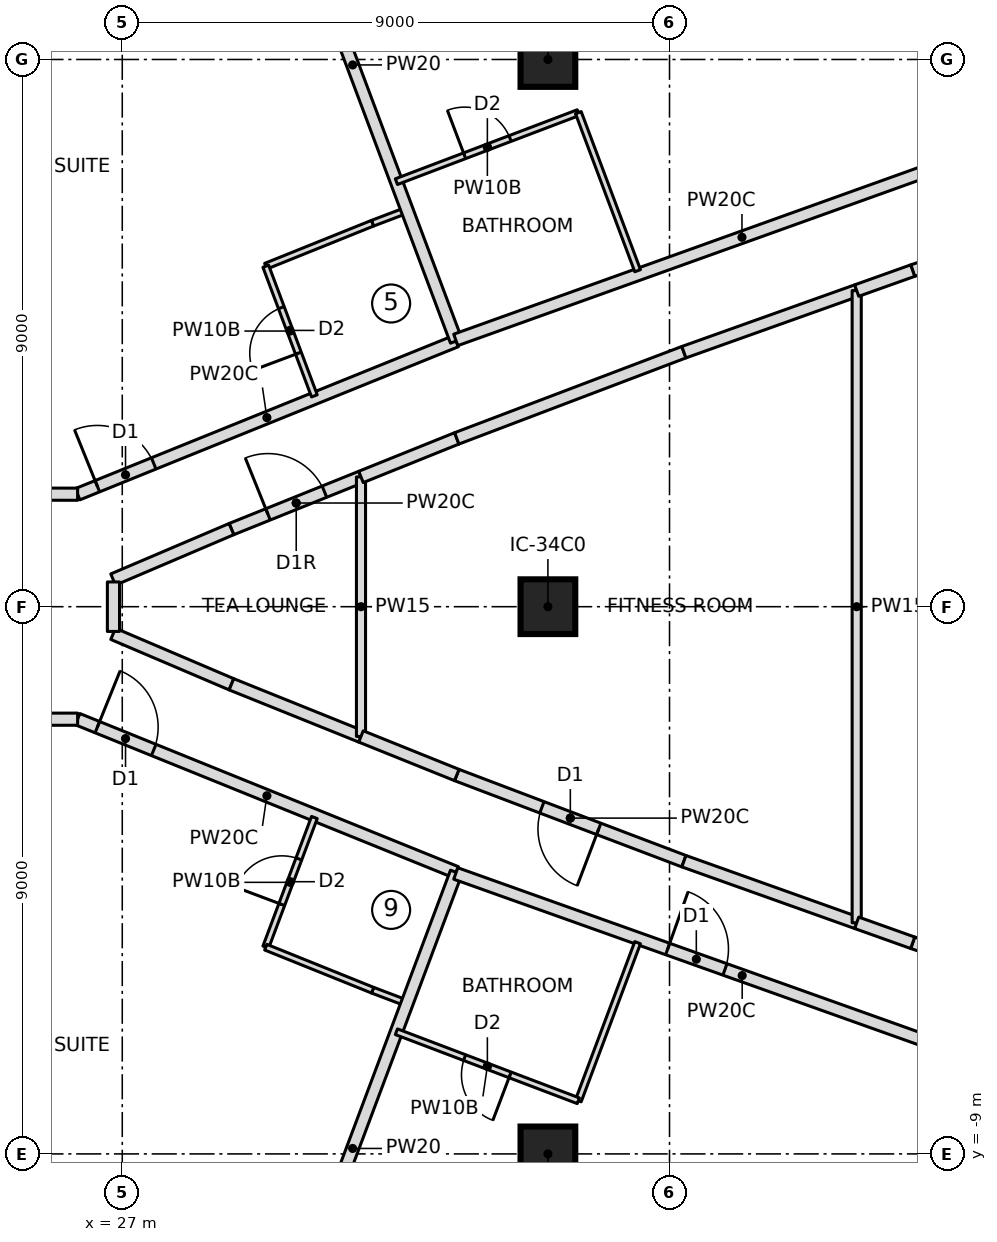
"""IFC4 building model, lengths in metres.
Left out: names, types, materials, properties, quantities, classifications, styles, units other than length and angle.
Written with IfcOpenShell. Run it as: python <this file> out.ifc"""

import sys

from ifc_helpers import new_model, si_unit, direction, frame, frame_2d, origin, origin_2d, place, context, subcontext, project, spatial, rectangle, extrude, element, fill, save


model = new_model("IFC4")
c1 = context("Model", 3, precision=1e-05, world=origin(), true_north=direction((0.0, 1.0)))
c2 = subcontext(c1, "Body", "Model", "MODEL_VIEW")
j1 = project(units=[si_unit("LENGTHUNIT", "METRE"), si_unit("PLANEANGLEUNIT", "RADIAN")], contexts=[c1])
p1 = place(None, origin())
s1 = spatial("IfcSite", under=j1, at=p1, CompositionType="ELEMENT")
p2 = place(p1, origin())
s2 = spatial("IfcBuilding", under=s1, at=p2, CompositionType="ELEMENT")
p3 = place(p2, frame((0.0, 0.0, 235.0)))
s3 = spatial("IfcBuildingStorey", under=s2, at=p3, CompositionType="ELEMENT", Elevation=235.0)
for number, where, z_axis, x_axis in (
    (1, (34.0, -9.0, 0.0), (0.0, 0.0, 1.0), (1.0, 0.0, 0.0)),
    (2, (34.0, 0.0, 0.0), (0.0, 0.0, 1.0), (1.0, 0.0, 0.0)),
    (3, (34.0, 9.0, 0.0), (0.0, 0.0, 1.0), (1.0, 0.0, 0.0)),
):
    element("IfcColumn", number, at=place(p3, frame(where, z_axis=z_axis, x_axis=x_axis)), inside=s3, PredefinedType="COLUMN", context=c2, shape_type="SweptSolid", body=[
        extrude(rectangle(XDim=0.9, YDim=0.9, at=origin_2d()), origin(), (0.0, 0.0, 1.0), 3.55),
    ])
p4 = place(p3, frame((26.266, 1.85, 0.0), z_axis=(0.0, 0.0, 1.0), x_axis=(0.927007906702, 0.375041785555, 0.0)))
e4 = element("IfcWall", 4, at=p4, inside=s3, PredefinedType="PARTITIONING", context=c2, shape_type="SweptSolid", body=[
    extrude(rectangle(XDim=6.716, YDim=0.2, at=frame_2d((3.358, 0.0))), origin(), (0.0, 0.0, 1.0), 3.25),
])
p5 = place(p4, frame((0.35, 0.0, 0.0)))
e5 = element("IfcOpeningElement", 5, at=p5, cuts=e4, PredefinedType="OPENING", context=c2, shape_type="SweptSolid", body=[
    extrude(rectangle(XDim=1.0, YDim=2.1, at=frame_2d((0.5, 1.05))), frame((0.0, 0.11, 0.0), z_axis=(0.0, -1.0, 0.0), x_axis=(1.0, 0.0, 0.0)), (0.0, 0.0, 1.0), 0.22),
])
p6 = place(p3, frame((29.36, 5.6, 0.0), z_axis=(0.0, 0.0, 1.0), x_axis=(0.927594225674, 0.373589283166, 0.0)))
e6 = element("IfcWall", 6, at=p6, inside=s3, PredefinedType="PARTITIONING", context=c2, shape_type="SweptSolid", body=[
    extrude(rectangle(XDim=1.895, YDim=0.1, at=frame_2d((0.947, 0.0))), origin(), (0.0, 0.0, 1.0), 3.25),
])
p7 = place(p3, frame((31.117, 6.308, 0.0), z_axis=(0.0, 0.0, 1.0), x_axis=(0.935048188903, 0.354520640342, 0.0)))
e7 = element("IfcWall", 7, at=p7, inside=s3, PredefinedType="PARTITIONING", context=c2, shape_type="SweptSolid", body=[
    extrude(rectangle(XDim=0.606, YDim=0.1, at=frame_2d((0.303, 0.0))), origin(), (0.0, 0.0, 1.0), 3.25),
])
p8 = place(p3, frame((30.16, 3.467, 0.0), z_axis=(0.0, 0.0, 1.0), x_axis=(-0.351158682313, 0.936315961541, 0.0)))
e8 = element("IfcWall", 8, at=p8, inside=s3, PredefinedType="PARTITIONING", context=c2, shape_type="SweptSolid", body=[
    extrude(rectangle(XDim=2.278, YDim=0.1, at=frame_2d((1.139, 0.0))), origin(), (0.0, 0.0, 1.0), 3.25),
])
p9 = place(p8, frame((0.75, 0.0, 0.0)))
e9 = element("IfcOpeningElement", 9, at=p9, cuts=e8, PredefinedType="OPENING", context=c2, shape_type="SweptSolid", body=[
    extrude(rectangle(XDim=0.8, YDim=2.1, at=frame_2d((0.4, 1.05))), frame((0.0, 0.06, 0.0), z_axis=(0.0, -1.0, 0.0), x_axis=(1.0, 0.0, 0.0)), (0.0, 0.0, 1.0), 0.12),
])
p10 = place(p3, frame((32.492, 4.369, 0.0), z_axis=(0.0, 0.0, 1.0), x_axis=(-0.351128958016, 0.93632710889, 0.0)))
e10 = element("IfcWall", 10, at=p10, inside=s3, PredefinedType="PARTITIONING", context=c2, shape_type="SweptSolid", body=[
    extrude(rectangle(XDim=9.7, YDim=0.2, at=frame_2d((4.85, 0.0))), origin(), (0.0, 0.0, 1.0), 3.25),
])
p11 = place(p3, frame((41.898, 7.764, 0.0), z_axis=(0.0, 0.0, 1.0), x_axis=(-0.941277643829, -0.337633525034, 0.0)))
e11 = element("IfcWall", 11, at=p11, inside=s3, PredefinedType="PARTITIONING", context=c2, shape_type="SweptSolid", body=[
    extrude(rectangle(XDim=10.001, YDim=0.2, at=frame_2d((5.0, 0.0))), origin(), (0.0, 0.0, 1.0), 3.25),
])
p12 = place(p11, frame((0.35, 0.0, 0.0)))
e12 = element("IfcOpeningElement", 12, at=p12, cuts=e11, PredefinedType="OPENING", context=c2, shape_type="SweptSolid", body=[
    extrude(rectangle(XDim=1.0, YDim=2.1, at=frame_2d((0.5, 1.05))), frame((0.0, 0.11, 0.0), z_axis=(0.0, -1.0, 0.0), x_axis=(1.0, 0.0, 0.0)), (0.0, 0.0, 1.0), 0.22),
])
p13 = place(p3, frame((31.509, 6.991, 0.0), z_axis=(0.0, 0.0, 1.0), x_axis=(0.934948661714, 0.354783032232, 0.0)))
e13 = element("IfcWall", 13, at=p13, inside=s3, PredefinedType="PARTITIONING", context=c2, shape_type="SweptSolid", body=[
    extrude(rectangle(XDim=3.2, YDim=0.1, at=frame_2d((1.6, 0.0))), origin(), (0.0, 0.0, 1.0), 3.25),
])
p14 = place(p13, frame((1.2, 0.0, 0.0)))
e14 = element("IfcOpeningElement", 14, at=p14, cuts=e13, PredefinedType="OPENING", context=c2, shape_type="SweptSolid", body=[
    extrude(rectangle(XDim=0.8, YDim=2.1, at=frame_2d((0.4, 1.05))), frame((0.0, 0.06, 0.0), z_axis=(0.0, -1.0, 0.0), x_axis=(1.0, 0.0, 0.0)), (0.0, 0.0, 1.0), 0.12),
])
p15 = place(p3, frame((34.5, 8.126, 0.0), z_axis=(0.0, 0.0, 1.0), x_axis=(0.351065630332, -0.936350854755, 0.0)))
e15 = element("IfcWall", 15, at=p15, inside=s3, PredefinedType="PARTITIONING", context=c2, shape_type="SweptSolid", body=[
    extrude(rectangle(XDim=2.777, YDim=0.1, at=frame_2d((1.388, 0.0))), origin(), (0.0, 0.0, 1.0), 3.25),
])
p16 = place(p3, frame((41.906, 7.746, 0.0), z_axis=(0.0, 0.0, 1.0), x_axis=(-0.35112895446, 0.936327110224, 0.0)))
e16 = element("IfcWall", 16, at=p16, inside=s3, PredefinedType="PARTITIONING", context=c2, shape_type="SweptSolid", body=[
    extrude(rectangle(XDim=9.706, YDim=0.2, at=frame_2d((4.853, 0.0))), origin(), (0.0, 0.0, 1.0), 3.25),
])
p17 = place(p3, frame((26.266, -1.85, 0.0), z_axis=(0.0, 0.0, 1.0), x_axis=(0.927007906702, -0.375041785555, 0.0)))
e17 = element("IfcWall", 17, at=p17, inside=s3, PredefinedType="PARTITIONING", context=c2, shape_type="SweptSolid", body=[
    extrude(rectangle(XDim=6.716, YDim=0.2, at=frame_2d((3.358, 0.0))), origin(), (0.0, 0.0, 1.0), 3.25),
])
p18 = place(p17, frame((0.35, 0.0, 0.0)))
e18 = element("IfcOpeningElement", 18, at=p18, cuts=e17, PredefinedType="OPENING", context=c2, shape_type="SweptSolid", body=[
    extrude(rectangle(XDim=1.0, YDim=2.1, at=frame_2d((0.5, 1.05))), frame((0.0, 0.11, 0.0), z_axis=(0.0, -1.0, 0.0), x_axis=(1.0, 0.0, 0.0)), (0.0, 0.0, 1.0), 0.22),
])
p19 = place(p3, frame((29.36, -5.6, 0.0), z_axis=(0.0, 0.0, 1.0), x_axis=(0.351158682313, 0.936315961541, 0.0)))
e19 = element("IfcWall", 19, at=p19, inside=s3, PredefinedType="PARTITIONING", context=c2, shape_type="SweptSolid", body=[
    extrude(rectangle(XDim=2.278, YDim=0.1, at=frame_2d((1.139, 0.0))), origin(), (0.0, 0.0, 1.0), 3.25),
])
p20 = place(p19, frame((0.75, 0.0, 0.0)))
e20 = element("IfcOpeningElement", 20, at=p20, cuts=e19, PredefinedType="OPENING", context=c2, shape_type="SweptSolid", body=[
    extrude(rectangle(XDim=0.8, YDim=2.1, at=frame_2d((0.4, 1.05))), frame((0.0, 0.06, 0.0), z_axis=(0.0, -1.0, 0.0), x_axis=(1.0, 0.0, 0.0)), (0.0, 0.0, 1.0), 0.12),
])
p21 = place(p3, frame((31.684, -6.522, 0.0), z_axis=(0.0, 0.0, 1.0), x_axis=(-0.935048188903, 0.354520640342, 0.0)))
e21 = element("IfcWall", 21, at=p21, inside=s3, PredefinedType="PARTITIONING", context=c2, shape_type="SweptSolid", body=[
    extrude(rectangle(XDim=0.606, YDim=0.1, at=frame_2d((0.303, 0.0))), origin(), (0.0, 0.0, 1.0), 3.25),
])
p22 = place(p3, frame((31.117, -6.308, 0.0), z_axis=(0.0, 0.0, 1.0), x_axis=(-0.927594225674, 0.373589283166, 0.0)))
e22 = element("IfcWall", 22, at=p22, inside=s3, PredefinedType="PARTITIONING", context=c2, shape_type="SweptSolid", body=[
    extrude(rectangle(XDim=1.895, YDim=0.1, at=frame_2d((0.947, 0.0))), origin(), (0.0, 0.0, 1.0), 3.25),
])
p23 = place(p3, frame((29.086, -13.451, 0.0), z_axis=(0.0, 0.0, 1.0), x_axis=(0.351128958016, 0.93632710889, 0.0)))
e23 = element("IfcWall", 23, at=p23, inside=s3, PredefinedType="PARTITIONING", context=c2, shape_type="SweptSolid", body=[
    extrude(rectangle(XDim=9.7, YDim=0.2, at=frame_2d((4.85, 0.0))), origin(), (0.0, 0.0, 1.0), 3.25),
])
p24 = place(p3, frame((32.485, -4.388, 0.0), z_axis=(0.0, 0.0, 1.0), x_axis=(0.941953797829, -0.335742524498, 0.0)))
e24 = element("IfcWall", 24, at=p24, inside=s3, PredefinedType="PARTITIONING", context=c2, shape_type="SweptSolid", body=[
    extrude(rectangle(XDim=10.001, YDim=0.2, at=frame_2d((5.001, 0.0))), origin(), (0.0, 0.0, 1.0), 3.25),
])
p25 = place(p24, frame((3.7, 0.0, 0.0)))
e25 = element("IfcOpeningElement", 25, at=p25, cuts=e24, PredefinedType="OPENING", context=c2, shape_type="SweptSolid", body=[
    extrude(rectangle(XDim=1.0, YDim=2.1, at=frame_2d((0.5, 1.05))), frame((0.0, 0.11, 0.0), z_axis=(0.0, -1.0, 0.0), x_axis=(1.0, 0.0, 0.0)), (0.0, 0.0, 1.0), 0.22),
])
p26 = place(p3, frame((35.475, -5.526, 0.0), z_axis=(0.0, 0.0, 1.0), x_axis=(-0.351065630332, -0.936350854755, 0.0)))
e26 = element("IfcWall", 26, at=p26, inside=s3, PredefinedType="PARTITIONING", context=c2, shape_type="SweptSolid", body=[
    extrude(rectangle(XDim=2.777, YDim=0.1, at=frame_2d((1.388, 0.0))), origin(), (0.0, 0.0, 1.0), 3.25),
])
p27 = place(p3, frame((34.5, -8.126, 0.0), z_axis=(0.0, 0.0, 1.0), x_axis=(-0.934948661714, 0.354783032232, 0.0)))
e27 = element("IfcWall", 27, at=p27, inside=s3, PredefinedType="PARTITIONING", context=c2, shape_type="SweptSolid", body=[
    extrude(rectangle(XDim=3.2, YDim=0.1, at=frame_2d((1.6, 0.0))), origin(), (0.0, 0.0, 1.0), 3.25),
])
p28 = place(p27, frame((1.2, 0.0, 0.0)))
e28 = element("IfcOpeningElement", 28, at=p28, cuts=e27, PredefinedType="OPENING", context=c2, shape_type="SweptSolid", body=[
    extrude(rectangle(XDim=0.8, YDim=2.1, at=frame_2d((0.4, 1.05))), frame((0.0, 0.06, 0.0), z_axis=(0.0, -1.0, 0.0), x_axis=(1.0, 0.0, 0.0)), (0.0, 0.0, 1.0), 0.12),
])
p29 = place(p3, frame((38.497, -16.834, 0.0), z_axis=(0.0, 0.0, 1.0), x_axis=(0.35112895446, 0.936327110224, 0.0)))
e29 = element("IfcWall", 29, at=p29, inside=s3, PredefinedType="PARTITIONING", context=c2, shape_type="SweptSolid", body=[
    extrude(rectangle(XDim=9.706, YDim=0.2, at=frame_2d((4.853, 0.0))), origin(), (0.0, 0.0, 1.0), 3.25),
])
p30 = place(p3, frame((28.796, 1.276, 0.0), z_axis=(0.0, 0.0, 1.0), x_axis=(0.927609077038, 0.373552406224, 0.0)))
e30 = element("IfcWall", 30, at=p30, inside=s3, PredefinedType="PARTITIONING", context=c2, shape_type="SweptSolid", body=[
    extrude(rectangle(XDim=2.297, YDim=0.2, at=frame_2d((1.148, 0.0))), origin(), (0.0, 0.0, 1.0), 3.25),
])
p31 = place(p30, frame((0.648, 0.0, 0.0)))
e31 = element("IfcOpeningElement", 31, at=p31, cuts=e30, PredefinedType="OPENING", context=c2, shape_type="SweptSolid", body=[
    extrude(rectangle(XDim=1.0, YDim=2.1, at=frame_2d((0.5, 1.05))), frame((0.0, 0.11, 0.0), z_axis=(0.0, -1.0, 0.0), x_axis=(1.0, 0.0, 0.0)), (0.0, 0.0, 1.0), 0.22),
])
for number, where, z_axis, x_axis in (
    (32, (28.796, -1.276, 0.0), (0.0, 0.0, 1.0), (-0.92, 0.392, 0.0)),
    (33, (26.85, 0.447, 0.0), (0.0, 0.0, 1.0), (0.92, 0.392, 0.0)),
):
    element("IfcWall", number, at=place(p3, frame(where, z_axis=z_axis, x_axis=x_axis)), inside=s3, PredefinedType="PARTITIONING", context=c2, shape_type="SweptSolid", body=[
        extrude(rectangle(XDim=2.115, YDim=0.2, at=frame_2d((1.058, 0.0))), origin(), (0.0, 0.0, 1.0), 3.25),
    ])
p32 = place(p3, frame((30.926, -2.134, 0.0), z_axis=(0.0, 0.0, 1.0), x_axis=(-0.927609077038, 0.373552406224, 0.0)))
e34 = element("IfcWall", 34, at=p32, inside=s3, PredefinedType="PARTITIONING", context=c2, shape_type="SweptSolid", body=[
    extrude(rectangle(XDim=2.297, YDim=0.2, at=frame_2d((1.148, 0.0))), origin(), (0.0, 0.0, 1.0), 3.25),
])
p33 = place(p3, frame((30.926, -2.134, 0.0), z_axis=(0.0, 0.0, 1.0), x_axis=(0.0, 1.0, 0.0)))
e35 = element("IfcWall", 35, at=p33, inside=s3, PredefinedType="PARTITIONING", context=c2, shape_type="SweptSolid", body=[
    extrude(rectangle(XDim=4.268, YDim=0.15, at=frame_2d((2.134, 0.0))), origin(), (0.0, 0.0, 1.0), 3.25),
])
p34 = place(p3, frame((36.236, -4.186, 0.0), z_axis=(0.0, 0.0, 1.0), x_axis=(-0.934950696546, 0.354777669856, 0.0)))
e36 = element("IfcWall", 36, at=p34, inside=s3, PredefinedType="PARTITIONING", context=c2, shape_type="SweptSolid", body=[
    extrude(rectangle(XDim=3.995, YDim=0.2, at=frame_2d((1.997, 0.0))), origin(), (0.0, 0.0, 1.0), 3.25),
])
p35 = place(p34, frame((1.498, 0.0, 0.0)))
e37 = element("IfcOpeningElement", 37, at=p35, cuts=e36, PredefinedType="OPENING", context=c2, shape_type="SweptSolid", body=[
    extrude(rectangle(XDim=1.0, YDim=2.1, at=frame_2d((0.5, 1.05))), frame((0.0, 0.11, 0.0), z_axis=(0.0, -1.0, 0.0), x_axis=(1.0, 0.0, 0.0)), (0.0, 0.0, 1.0), 0.22),
])
p36 = place(p3, frame((39.078, -5.199, 0.0), z_axis=(0.0, 0.0, 1.0), x_axis=(-0.941908381697, 0.335869916023, 0.0)))
e38 = element("IfcWall", 38, at=p36, inside=s3, PredefinedType="PARTITIONING", context=c2, shape_type="SweptSolid", body=[
    extrude(rectangle(XDim=3.017, YDim=0.2, at=frame_2d((1.509, 0.0))), origin(), (0.0, 0.0, 1.0), 3.25),
])
for number, where, z_axis, x_axis in (
    (39, (32.501, -2.768, 0.0), (0.0, 0.0, 1.0), (-0.928, 0.373, 0.0)),
    (40, (30.926, 2.134, 0.0), (0.0, 0.0, 1.0), (0.928, 0.373, 0.0)),
):
    element("IfcWall", number, at=place(p3, frame(where, z_axis=z_axis, x_axis=x_axis)), inside=s3, PredefinedType="PARTITIONING", context=c2, shape_type="SweptSolid", body=[
        extrude(rectangle(XDim=1.698, YDim=0.2, at=frame_2d((0.849, 0.0))), origin(), (0.0, 0.0, 1.0), 3.25),
    ])
p37 = place(p3, frame((32.501, 2.768, 0.0), z_axis=(0.0, 0.0, 1.0), x_axis=(0.934950696546, 0.354777669856, 0.0)))
e41 = element("IfcWall", 41, at=p37, inside=s3, PredefinedType="PARTITIONING", context=c2, shape_type="SweptSolid", body=[
    extrude(rectangle(XDim=3.995, YDim=0.2, at=frame_2d((1.997, 0.0))), origin(), (0.0, 0.0, 1.0), 3.25),
])
p38 = place(p3, frame((36.236, 4.186, 0.0), z_axis=(0.0, 0.0, 1.0), x_axis=(0.941908381697, 0.335869916023, 0.0)))
e42 = element("IfcWall", 42, at=p38, inside=s3, PredefinedType="PARTITIONING", context=c2, shape_type="SweptSolid", body=[
    extrude(rectangle(XDim=3.017, YDim=0.2, at=frame_2d((1.509, 0.0))), origin(), (0.0, 0.0, 1.0), 3.25),
])
p39 = place(p3, frame((39.078, -5.199, 0.0), z_axis=(0.0, 0.0, 1.0), x_axis=(0.0, 1.0, 0.0)))
e43 = element("IfcWall", 43, at=p39, inside=s3, PredefinedType="PARTITIONING", context=c2, shape_type="SweptSolid", body=[
    extrude(rectangle(XDim=10.398, YDim=0.15, at=frame_2d((5.199, 0.0))), origin(), (0.0, 0.0, 1.0), 3.25),
])
p40 = place(p3, frame((39.999, 5.527, 0.0), z_axis=(0.0, 0.0, 1.0), x_axis=(0.9484714727, 0.316862534034, 0.0)))
e44 = element("IfcWall", 44, at=p40, inside=s3, PredefinedType="PARTITIONING", context=c2, shape_type="SweptSolid", body=[
    extrude(rectangle(XDim=2.192, YDim=0.2, at=frame_2d((1.096, 0.0))), origin(), (0.0, 0.0, 1.0), 3.25),
])
p41 = place(p40, frame((0.596, 0.0, 0.0)))
e45 = element("IfcOpeningElement", 45, at=p41, cuts=e44, PredefinedType="OPENING", context=c2, shape_type="SweptSolid", body=[
    extrude(rectangle(XDim=1.0, YDim=2.1, at=frame_2d((0.5, 1.05))), frame((0.0, 0.11, 0.0), z_axis=(0.0, -1.0, 0.0), x_axis=(1.0, 0.0, 0.0)), (0.0, 0.0, 1.0), 0.22),
])
p42 = place(p3, frame((42.078, -6.222, 0.0), z_axis=(0.0, 0.0, 1.0), x_axis=(-0.9484714727, 0.316862534034, 0.0)))
e46 = element("IfcWall", 46, at=p42, inside=s3, PredefinedType="PARTITIONING", context=c2, shape_type="SweptSolid", body=[
    extrude(rectangle(XDim=2.192, YDim=0.2, at=frame_2d((1.096, 0.0))), origin(), (0.0, 0.0, 1.0), 3.25),
])
for number, where, z_axis, x_axis in (
    (47, (39.999, -5.527, 0.0), (0.0, 0.0, 1.0), (-0.942, 0.336, 0.0)),
    (48, (39.078, 5.199, 0.0), (0.0, 0.0, 1.0), (0.942, 0.336, 0.0)),
):
    element("IfcWall", number, at=place(p3, frame(where, z_axis=z_axis, x_axis=x_axis)), inside=s3, PredefinedType="PARTITIONING", context=c2, shape_type="SweptSolid", body=[
        extrude(rectangle(XDim=0.978, YDim=0.2, at=frame_2d((0.489, 0.0))), origin(), (0.0, 0.0, 1.0), 3.25),
    ])
p43 = place(p3, frame((26.855, -0.407, 0.0), z_axis=(0.0, 0.0, 1.0), x_axis=(0.0, 1.0, 0.0)))
e49 = element("IfcWall", 49, at=p43, inside=s3, PredefinedType="PARTITIONING", context=c2, shape_type="SweptSolid", body=[
    extrude(rectangle(XDim=0.814, YDim=0.2, at=frame_2d((0.407, 0.0))), origin(), (0.0, 0.0, 1.0), 3.25),
])
p44 = place(p3, frame((26.266, 1.85, 0.0), z_axis=(0.0, 0.0, 1.0), x_axis=(-0.999998892962, 0.001487977051, 0.0)))
e50 = element("IfcWall", 50, at=p44, inside=s3, PredefinedType="PARTITIONING", context=c2, shape_type="SweptSolid", body=[
    extrude(rectangle(XDim=3.117, YDim=0.2, at=frame_2d((1.559, 0.0))), origin(), (0.0, 0.0, 1.0), 3.25),
])
p45 = place(p3, frame((23.148, -1.854, 0.0), z_axis=(0.0, 0.0, 1.0), x_axis=(0.999999006581, 0.001409552241, 0.0)))
e51 = element("IfcWall", 51, at=p45, inside=s3, PredefinedType="PARTITIONING", context=c2, shape_type="SweptSolid", body=[
    extrude(rectangle(XDim=3.118, YDim=0.2, at=frame_2d((1.559, 0.0))), origin(), (0.0, 0.0, 1.0), 3.25),
])
p46 = place(p9, origin())
e52 = element("IfcDoor", 52, at=p46, inside=s3, OperationType="SINGLE_SWING_LEFT", PredefinedType="DOOR", context=c2, shape_type="SweptSolid", body=[
    extrude(rectangle(XDim=0.8, YDim=2.1, at=frame_2d((0.4, 1.05))), frame((0.0, 0.025, 0.0), z_axis=(0.0, -1.0, 0.0), x_axis=(1.0, 0.0, 0.0)), (0.0, 0.0, 1.0), 0.05),
])
fill(e9, e52)
p47 = place(p5, origin())
e53 = element("IfcDoor", 53, at=p47, inside=s3, OperationType="SINGLE_SWING_LEFT", PredefinedType="DOOR", context=c2, shape_type="SweptSolid", body=[
    extrude(rectangle(XDim=1.0, YDim=2.1, at=frame_2d((0.5, 1.05))), frame((0.0, 0.025, 0.0), z_axis=(0.0, -1.0, 0.0), x_axis=(1.0, 0.0, 0.0)), (0.0, 0.0, 1.0), 0.05),
])
fill(e5, e53)
p48 = place(p14, origin())
e54 = element("IfcDoor", 54, at=p48, inside=s3, OperationType="SINGLE_SWING_LEFT", PredefinedType="DOOR", context=c2, shape_type="SweptSolid", body=[
    extrude(rectangle(XDim=0.8, YDim=2.1, at=frame_2d((0.4, 1.05))), frame((0.0, 0.025, 0.0), z_axis=(0.0, -1.0, 0.0), x_axis=(1.0, 0.0, 0.0)), (0.0, 0.0, 1.0), 0.05),
])
fill(e14, e54)
p49 = place(p20, origin())
e55 = element("IfcDoor", 55, at=p49, inside=s3, OperationType="SINGLE_SWING_LEFT", PredefinedType="DOOR", context=c2, shape_type="SweptSolid", body=[
    extrude(rectangle(XDim=0.8, YDim=2.1, at=frame_2d((0.4, 1.05))), frame((0.0, 0.025, 0.0), z_axis=(0.0, -1.0, 0.0), x_axis=(1.0, 0.0, 0.0)), (0.0, 0.0, 1.0), 0.05),
])
fill(e20, e55)
p50 = place(p18, origin())
e56 = element("IfcDoor", 56, at=p50, inside=s3, OperationType="SINGLE_SWING_LEFT", PredefinedType="DOOR", context=c2, shape_type="SweptSolid", body=[
    extrude(rectangle(XDim=1.0, YDim=2.1, at=frame_2d((0.5, 1.05))), frame((0.0, 0.025, 0.0), z_axis=(0.0, -1.0, 0.0), x_axis=(1.0, 0.0, 0.0)), (0.0, 0.0, 1.0), 0.05),
])
fill(e18, e56)
p51 = place(p28, origin())
e57 = element("IfcDoor", 57, at=p51, inside=s3, OperationType="SINGLE_SWING_LEFT", PredefinedType="DOOR", context=c2, shape_type="SweptSolid", body=[
    extrude(rectangle(XDim=0.8, YDim=2.1, at=frame_2d((0.4, 1.05))), frame((0.0, 0.025, 0.0), z_axis=(0.0, -1.0, 0.0), x_axis=(1.0, 0.0, 0.0)), (0.0, 0.0, 1.0), 0.05),
])
fill(e28, e57)
p52 = place(p25, origin())
e58 = element("IfcDoor", 58, at=p52, inside=s3, OperationType="SINGLE_SWING_LEFT", PredefinedType="DOOR", context=c2, shape_type="SweptSolid", body=[
    extrude(rectangle(XDim=1.0, YDim=2.1, at=frame_2d((0.5, 1.05))), frame((0.0, 0.025, 0.0), z_axis=(0.0, -1.0, 0.0), x_axis=(1.0, 0.0, 0.0)), (0.0, 0.0, 1.0), 0.05),
])
fill(e25, e58)
p53 = place(p31, origin())
e59 = element("IfcDoor", 59, at=p53, inside=s3, OperationType="SINGLE_SWING_RIGHT", PredefinedType="DOOR", context=c2, shape_type="SweptSolid", body=[
    extrude(rectangle(XDim=1.0, YDim=2.1, at=frame_2d((0.5, 1.05))), frame((0.0, 0.025, 0.0), z_axis=(0.0, -1.0, 0.0), x_axis=(1.0, 0.0, 0.0)), (0.0, 0.0, 1.0), 0.05),
])
fill(e31, e59)
p54 = place(p35, origin())
e60 = element("IfcDoor", 60, at=p54, inside=s3, OperationType="SINGLE_SWING_LEFT", PredefinedType="DOOR", context=c2, shape_type="SweptSolid", body=[
    extrude(rectangle(XDim=1.0, YDim=2.1, at=frame_2d((0.5, 1.05))), frame((0.0, 0.025, 0.0), z_axis=(0.0, -1.0, 0.0), x_axis=(1.0, 0.0, 0.0)), (0.0, 0.0, 1.0), 0.05),
])
fill(e37, e60)
save(model, sys.argv[1])
